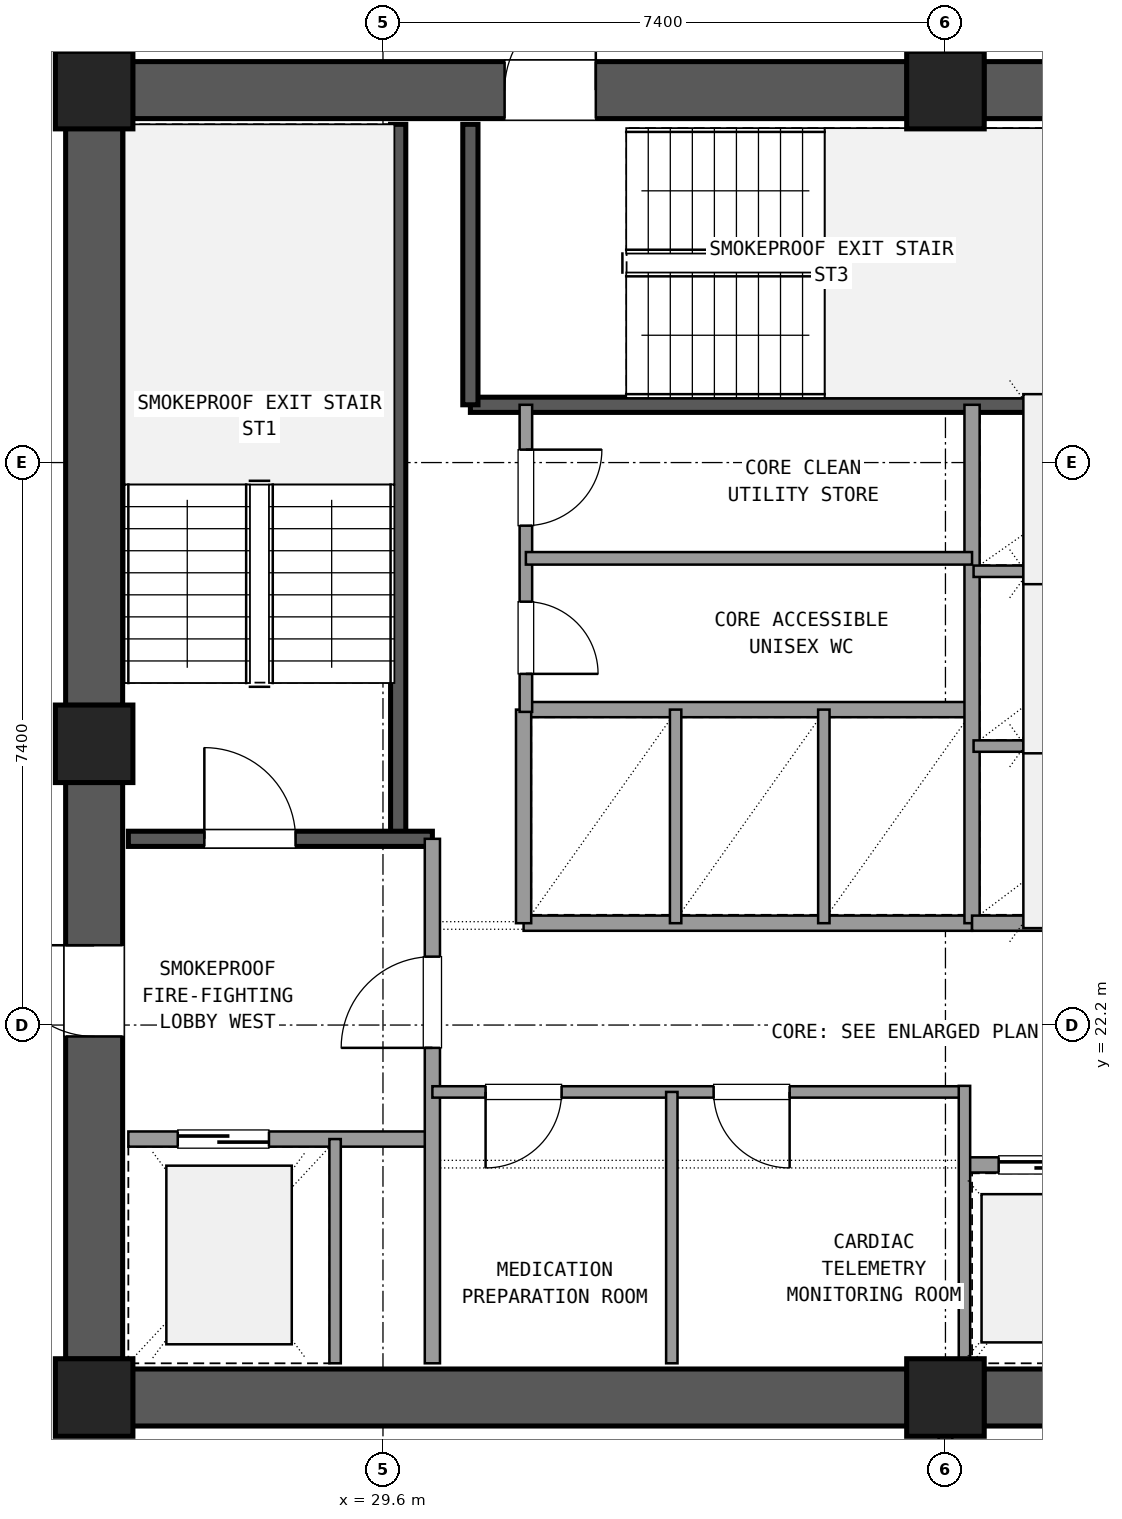
"""IFC4 building model, lengths in metres.
Left out: names, types, materials, properties, quantities, classifications, styles, units other than length and angle.
Written with IfcOpenShell. Run it as: python <this file> out.ifc"""

import sys

from ifc_helpers import new_model, si_unit, direction, frame, frame_2d, origin, origin_2d, place, context, subcontext, project, spatial, rectangle, extrude, element, fill, save


model = new_model("IFC4")
c1 = context("Model", 3, precision=1e-05, world=origin(), true_north=direction((0.0, 1.0)))
c2 = subcontext(c1, "Body", "Model", "MODEL_VIEW")
j1 = project(units=[si_unit("LENGTHUNIT", "METRE"), si_unit("PLANEANGLEUNIT", "RADIAN")], contexts=[c1])
p1 = place(None, origin())
s1 = spatial("IfcSite", under=j1, at=p1, CompositionType="ELEMENT")
p2 = place(p1, origin())
s2 = spatial("IfcBuilding", under=s1, at=p2, CompositionType="ELEMENT")
p3 = place(p2, frame((0.0, 0.0, 138.42)))
s3 = spatial("IfcBuildingStorey", under=s2, at=p3, CompositionType="ELEMENT", Elevation=138.42)
for number, where, z_axis, x_axis in (
    (1, (25.8, 17.3, 0.0), (0.0, 0.0, 1.0), (1.0, 0.0, 0.0)),
    (2, (37.0, 17.3, 0.0), (0.0, 0.0, 1.0), (1.0, 0.0, 0.0)),
    (3, (37.0, 34.5, 0.0), (0.0, 0.0, 1.0), (1.0, 0.0, 0.0)),
    (4, (25.8, 34.5, 0.0), (0.0, 0.0, 1.0), (1.0, 0.0, 0.0)),
    (5, (25.8, 25.9, 0.0), (0.0, 0.0, 1.0), (1.0, 0.0, 0.0)),
):
    element("IfcColumn", number, at=place(p3, frame(where, z_axis=z_axis, x_axis=x_axis)), inside=s3, PredefinedType="COLUMN", context=c2, shape_type="SweptSolid", body=[
        extrude(rectangle(XDim=1.02, YDim=1.02, at=origin_2d()), origin(), (0.0, 0.0, 1.0), 3.6),
    ])
for number, where, z_axis, x_axis in (
    (6, (26.305, 17.3, 0.0), (0.0, 0.0, 1.0), (1.0, 0.0, 0.0)),
    (7, (37.505, 17.3, 0.0), (0.0, 0.0, 1.0), (1.0, 0.0, 0.0)),
):
    element("IfcWall", number, at=place(p3, frame(where, z_axis=z_axis, x_axis=x_axis)), inside=s3, PredefinedType="SHEAR", context=c2, shape_type="SweptSolid", body=[
        extrude(rectangle(XDim=10.19, YDim=0.75, at=frame_2d((5.095, 0.0))), origin(), (0.0, 0.0, 1.0), 3.32),
    ])
p4 = place(p3, frame((47.695, 34.5, 0.0), z_axis=(0.0, 0.0, 1.0), x_axis=(-1.0, 0.0, 0.0)))
e8 = element("IfcWall", 8, at=p4, inside=s3, PredefinedType="SHEAR", context=c2, shape_type="SweptSolid", body=[
    extrude(rectangle(XDim=10.19, YDim=0.75, at=frame_2d((5.095, 0.0))), origin(), (0.0, 0.0, 1.0), 3.32),
])
p5 = place(p4, frame((4.595, 0.0, 0.0)))
e9 = element("IfcOpeningElement", 9, at=p5, cuts=e8, PredefinedType="OPENING", context=c2, shape_type="SweptSolid", body=[
    extrude(rectangle(XDim=1.6, YDim=2.2, at=frame_2d((0.8, 1.1))), frame((0.0, 0.385, 0.0), z_axis=(0.0, -1.0, 0.0), x_axis=(1.0, 0.0, 0.0)), (0.0, 0.0, 1.0), 0.77),
])
p6 = place(p3, frame((36.495, 34.5, 0.0), z_axis=(0.0, 0.0, 1.0), x_axis=(-1.0, 0.0, 0.0)))
e10 = element("IfcWall", 10, at=p6, inside=s3, PredefinedType="SHEAR", context=c2, shape_type="SweptSolid", body=[
    extrude(rectangle(XDim=10.19, YDim=0.75, at=frame_2d((5.095, 0.0))), origin(), (0.0, 0.0, 1.0), 3.32),
])
p7 = place(p6, frame((4.095, 0.0, 0.0)))
e11 = element("IfcOpeningElement", 11, at=p7, cuts=e10, PredefinedType="OPENING", context=c2, shape_type="SweptSolid", body=[
    extrude(rectangle(XDim=1.2, YDim=2.15, at=frame_2d((0.6, 1.075))), frame((0.0, 0.385, 0.0), z_axis=(0.0, -1.0, 0.0), x_axis=(1.0, 0.0, 0.0)), (0.0, 0.0, 1.0), 0.77),
])
p8 = place(p3, frame((25.8, 33.995, 0.0), z_axis=(0.0, 0.0, 1.0), x_axis=(0.0, -1.0, 0.0)))
e12 = element("IfcWall", 12, at=p8, inside=s3, PredefinedType="SHEAR", context=c2, shape_type="SweptSolid", body=[
    extrude(rectangle(XDim=7.59, YDim=0.75, at=frame_2d((3.795, 0.0))), origin(), (0.0, 0.0, 1.0), 3.32),
])
p9 = place(p3, frame((25.8, 25.395, 0.0), z_axis=(0.0, 0.0, 1.0), x_axis=(0.0, -1.0, 0.0)))
e13 = element("IfcWall", 13, at=p9, inside=s3, PredefinedType="SHEAR", context=c2, shape_type="SweptSolid", body=[
    extrude(rectangle(XDim=7.59, YDim=0.75, at=frame_2d((3.795, 0.0))), origin(), (0.0, 0.0, 1.0), 3.32),
])
p10 = place(p9, frame((2.145, 0.0, 0.0)))
e14 = element("IfcOpeningElement", 14, at=p10, cuts=e13, PredefinedType="OPENING", context=c2, shape_type="SweptSolid", body=[
    extrude(rectangle(XDim=1.2, YDim=2.15, at=frame_2d((0.6, 1.075))), frame((0.0, 0.385, 0.0), z_axis=(0.0, -1.0, 0.0), x_axis=(1.0, 0.0, 0.0)), (0.0, 0.0, 1.0), 0.77),
])
p11 = place(p3, frame((29.8, 24.65, 0.0), z_axis=(0.0, 0.0, 1.0), x_axis=(0.0, 1.0, 0.0)))
e15 = element("IfcWall", 15, at=p11, inside=s3, PredefinedType="SHEAR", context=c2, shape_type="SweptSolid", body=[
    extrude(rectangle(XDim=9.4, YDim=0.2, at=frame_2d((4.7, 0.0))), origin(), (0.0, 0.0, 1.0), 3.32),
])
p12 = place(p3, frame((26.25, 24.65, 0.0), z_axis=(0.0, 0.0, 1.0), x_axis=(1.0, 0.0, 0.0)))
e16 = element("IfcWall", 16, at=p12, inside=s3, PredefinedType="SHEAR", context=c2, shape_type="SweptSolid", body=[
    extrude(rectangle(XDim=4.0, YDim=0.2, at=frame_2d((2.0, 0.0))), origin(), (0.0, 0.0, 1.0), 3.32),
])
p13 = place(p12, frame((1.0, 0.0, 0.0)))
e17 = element("IfcOpeningElement", 17, at=p13, cuts=e16, PredefinedType="OPENING", context=c2, shape_type="SweptSolid", body=[
    extrude(rectangle(XDim=1.2, YDim=2.15, at=frame_2d((0.6, 1.075))), frame((0.0, 0.11, 0.0), z_axis=(0.0, -1.0, 0.0), x_axis=(1.0, 0.0, 0.0)), (0.0, 0.0, 1.0), 0.22),
])
p14 = place(p3, frame((30.75, 30.36, 0.0), z_axis=(0.0, 0.0, 1.0), x_axis=(1.0, 0.0, 0.0)))
e18 = element("IfcWall", 18, at=p14, inside=s3, PredefinedType="SHEAR", context=c2, shape_type="SweptSolid", body=[
    extrude(rectangle(XDim=9.5, YDim=0.2, at=frame_2d((4.75, 0.0))), origin(), (0.0, 0.0, 1.0), 3.32),
])
p15 = place(p3, frame((30.75, 30.36, 0.0), z_axis=(0.0, 0.0, 1.0), x_axis=(0.0, 1.0, 0.0)))
e19 = element("IfcWall", 19, at=p15, inside=s3, PredefinedType="SHEAR", context=c2, shape_type="SweptSolid", body=[
    extrude(rectangle(XDim=3.69, YDim=0.2, at=frame_2d((1.845, 0.0))), origin(), (0.0, 0.0, 1.0), 3.32),
])
p16 = place(p3, frame((26.25, 20.7, 0.0), z_axis=(0.0, 0.0, 1.0), x_axis=(1.0, 0.0, 0.0)))
e20 = element("IfcWall", 20, at=p16, inside=s3, PredefinedType="SOLIDWALL", context=c2, shape_type="SweptSolid", body=[
    extrude(rectangle(XDim=4.0, YDim=0.2, at=frame_2d((2.0, 0.0))), origin(), (0.0, 0.0, 1.0), 2.61),
])
p17 = place(p16, frame((0.65, 0.0, 0.0)))
e21 = element("IfcOpeningElement", 21, at=p17, cuts=e20, PredefinedType="OPENING", context=c2, shape_type="SweptSolid", body=[
    extrude(rectangle(XDim=1.2, YDim=2.15, at=frame_2d((0.6, 1.075))), frame((0.0, 0.11, 0.0), z_axis=(0.0, -1.0, 0.0), x_axis=(1.0, 0.0, 0.0)), (0.0, 0.0, 1.0), 0.22),
])
p18 = place(p3, frame((30.25, 17.75, 0.0), z_axis=(0.0, 0.0, 1.0), x_axis=(0.0, 1.0, 0.0)))
e22 = element("IfcWall", 22, at=p18, inside=s3, PredefinedType="SOLIDWALL", context=c2, shape_type="SweptSolid", body=[
    extrude(rectangle(XDim=6.9, YDim=0.2, at=frame_2d((3.45, 0.0))), origin(), (0.0, 0.0, 1.0), 2.61),
])
p19 = place(p18, frame((4.15, 0.0, 0.0)))
e23 = element("IfcOpeningElement", 23, at=p19, cuts=e22, PredefinedType="OPENING", context=c2, shape_type="SweptSolid", body=[
    extrude(rectangle(XDim=1.2, YDim=2.15, at=frame_2d((0.6, 1.075))), frame((0.0, 0.11, 0.0), z_axis=(0.0, -1.0, 0.0), x_axis=(1.0, 0.0, 0.0)), (0.0, 0.0, 1.0), 0.22),
])
p20 = place(p3, frame((28.97, 17.75, 0.0), z_axis=(0.0, 0.0, 1.0), x_axis=(0.0, 1.0, 0.0)))
e24 = element("IfcWall", 24, at=p20, inside=s3, PredefinedType="PARTITIONING", context=c2, shape_type="SweptSolid", body=[
    extrude(rectangle(XDim=2.95, YDim=0.15, at=frame_2d((1.475, 0.0))), origin(), (0.0, 0.0, 1.0), 2.61),
])
p21 = place(p3, frame((30.25, 21.32, 0.0), z_axis=(0.0, 0.0, 1.0), x_axis=(1.0, 0.0, 0.0)))
e25 = element("IfcWall", 25, at=p21, inside=s3, PredefinedType="PARTITIONING", context=c2, shape_type="SweptSolid", body=[
    extrude(rectangle(XDim=7.0, YDim=0.15, at=frame_2d((3.5, 0.0))), origin(), (0.0, 0.0, 1.0), 2.61),
])
p22 = place(p21, frame((0.7, 0.0, 0.0)))
e26 = element("IfcOpeningElement", 26, at=p22, cuts=e25, PredefinedType="OPENING", context=c2, shape_type="SweptSolid", body=[
    extrude(rectangle(XDim=1.0, YDim=2.15, at=frame_2d((0.5, 1.075))), frame((0.0, 0.085, 0.0), z_axis=(0.0, -1.0, 0.0), x_axis=(1.0, 0.0, 0.0)), (0.0, 0.0, 1.0), 0.17),
])
p23 = place(p21, frame((3.7, 0.0, 0.0)))
e27 = element("IfcOpeningElement", 27, at=p23, cuts=e25, PredefinedType="OPENING", context=c2, shape_type="SweptSolid", body=[
    extrude(rectangle(XDim=1.0, YDim=2.15, at=frame_2d((0.5, 1.075))), frame((0.0, 0.085, 0.0), z_axis=(0.0, -1.0, 0.0), x_axis=(1.0, 0.0, 0.0)), (0.0, 0.0, 1.0), 0.17),
])
p24 = place(p3, frame((33.4, 17.75, 0.0), z_axis=(0.0, 0.0, 1.0), x_axis=(0.0, 1.0, 0.0)))
e28 = element("IfcWall", 28, at=p24, inside=s3, PredefinedType="PARTITIONING", context=c2, shape_type="SweptSolid", body=[
    extrude(rectangle(XDim=3.57, YDim=0.15, at=frame_2d((1.785, 0.0))), origin(), (0.0, 0.0, 1.0), 2.61),
])
p25 = place(p3, frame((37.25, 20.36, 0.0), z_axis=(0.0, 0.0, 1.0), x_axis=(1.0, 0.0, 0.0)))
e29 = element("IfcWall", 29, at=p25, inside=s3, PredefinedType="SOLIDWALL", context=c2, shape_type="SweptSolid", body=[
    extrude(rectangle(XDim=6.1, YDim=0.2, at=frame_2d((3.05, 0.0))), origin(), (0.0, 0.0, 1.0), 2.61),
])
p26 = place(p25, frame((0.45, 0.0, 0.0)))
e30 = element("IfcOpeningElement", 30, at=p26, cuts=e29, PredefinedType="OPENING", context=c2, shape_type="SweptSolid", body=[
    extrude(rectangle(XDim=1.1, YDim=2.15, at=frame_2d((0.55, 1.075))), frame((0.0, 0.11, 0.0), z_axis=(0.0, -1.0, 0.0), x_axis=(1.0, 0.0, 0.0)), (0.0, 0.0, 1.0), 0.22),
])
p27 = place(p25, frame((2.5, 0.0, 0.0)))
e31 = element("IfcOpeningElement", 31, at=p27, cuts=e29, PredefinedType="OPENING", context=c2, shape_type="SweptSolid", body=[
    extrude(rectangle(XDim=1.1, YDim=2.15, at=frame_2d((0.55, 1.075))), frame((0.0, 0.11, 0.0), z_axis=(0.0, -1.0, 0.0), x_axis=(1.0, 0.0, 0.0)), (0.0, 0.0, 1.0), 0.22),
])
p28 = place(p25, frame((4.55, 0.0, 0.0)))
e32 = element("IfcOpeningElement", 32, at=p28, cuts=e29, PredefinedType="OPENING", context=c2, shape_type="SweptSolid", body=[
    extrude(rectangle(XDim=1.1, YDim=2.15, at=frame_2d((0.55, 1.075))), frame((0.0, 0.11, 0.0), z_axis=(0.0, -1.0, 0.0), x_axis=(1.0, 0.0, 0.0)), (0.0, 0.0, 1.0), 0.22),
])
p29 = place(p3, frame((37.25, 17.75, 0.0), z_axis=(0.0, 0.0, 1.0), x_axis=(0.0, 1.0, 0.0)))
e33 = element("IfcWall", 33, at=p29, inside=s3, PredefinedType="PARTITIONING", context=c2, shape_type="SweptSolid", body=[
    extrude(rectangle(XDim=3.65, YDim=0.15, at=frame_2d((1.825, 0.0))), origin(), (0.0, 0.0, 1.0), 2.61),
])
for number, where, z_axis, x_axis in (
    (34, (31.45, 23.54, 0.0), (0.0, 0.0, 1.0), (1.0, 0.0, 0.0)),
    (35, (31.45, 26.35, 0.0), (0.0, 0.0, 1.0), (1.0, 0.0, 0.0)),
):
    element("IfcWall", number, at=place(p3, frame(where, z_axis=z_axis, x_axis=x_axis)), inside=s3, PredefinedType="SOLIDWALL", context=c2, shape_type="SweptSolid", body=[
        extrude(rectangle(XDim=5.9, YDim=0.2, at=frame_2d((2.95, 0.0))), origin(), (0.0, 0.0, 1.0), 2.61),
    ])
p30 = place(p3, frame((31.45, 23.54, 0.0), z_axis=(0.0, 0.0, 1.0), x_axis=(0.0, 1.0, 0.0)))
e36 = element("IfcWall", 36, at=p30, inside=s3, PredefinedType="SOLIDWALL", context=c2, shape_type="SweptSolid", body=[
    extrude(rectangle(XDim=2.81, YDim=0.2, at=frame_2d((1.405, 0.0))), origin(), (0.0, 0.0, 1.0), 2.61),
])
for number, where, z_axis, x_axis in (
    (37, (33.45, 23.54, 0.0), (0.0, 0.0, 1.0), (0.0, 1.0, 0.0)),
    (38, (35.4, 23.54, 0.0), (0.0, 0.0, 1.0), (0.0, 1.0, 0.0)),
):
    element("IfcWall", number, at=place(p3, frame(where, z_axis=z_axis, x_axis=x_axis)), inside=s3, PredefinedType="PARTITIONING", context=c2, shape_type="SweptSolid", body=[
        extrude(rectangle(XDim=2.81, YDim=0.15, at=frame_2d((1.405, 0.0))), origin(), (0.0, 0.0, 1.0), 2.61),
    ])
p31 = place(p3, frame((37.35, 23.54, 0.0), z_axis=(0.0, 0.0, 1.0), x_axis=(0.0, 1.0, 0.0)))
e39 = element("IfcWall", 39, at=p31, inside=s3, PredefinedType="SOLIDWALL", context=c2, shape_type="SweptSolid", body=[
    extrude(rectangle(XDim=6.82, YDim=0.2, at=frame_2d((3.41, 0.0))), origin(), (0.0, 0.0, 1.0), 2.61),
])
p32 = place(p3, frame((37.35, 23.54, 0.0), z_axis=(0.0, 0.0, 1.0), x_axis=(1.0, 0.0, 0.0)))
e40 = element("IfcWall", 40, at=p32, inside=s3, PredefinedType="SOLIDWALL", context=c2, shape_type="SweptSolid", body=[
    extrude(rectangle(XDim=3.05, YDim=0.2, at=frame_2d((1.525, 0.0))), origin(), (0.0, 0.0, 1.0), 2.61),
])
for number, where, z_axis, x_axis in (
    (41, (37.37, 25.87, 0.0), (0.0, 0.0, 1.0), (1.0, 0.0, 0.0)),
    (42, (37.37, 28.17, 0.0), (0.0, 0.0, 1.0), (1.0, 0.0, 0.0)),
):
    element("IfcWall", number, at=place(p3, frame(where, z_axis=z_axis, x_axis=x_axis)), inside=s3, PredefinedType="PARTITIONING", context=c2, shape_type="SweptSolid", body=[
        extrude(rectangle(XDim=3.01, YDim=0.15, at=frame_2d((1.505, 0.0))), origin(), (0.0, 0.0, 1.0), 2.61),
    ])
p33 = place(p3, frame((31.48, 26.32, 0.0), z_axis=(0.0, 0.0, 1.0), x_axis=(0.0, 1.0, 0.0)))
e43 = element("IfcWall", 43, at=p33, inside=s3, PredefinedType="PLUMBINGWALL", context=c2, shape_type="SweptSolid", body=[
    extrude(rectangle(XDim=4.04, YDim=0.165, at=frame_2d((2.02, 0.0))), origin(), (0.0, 0.0, 1.0), 2.61),
])
p34 = place(p33, frame((0.5, 0.0, 0.0)))
e44 = element("IfcOpeningElement", 44, at=p34, cuts=e43, PredefinedType="OPENING", context=c2, shape_type="SweptSolid", body=[
    extrude(rectangle(XDim=0.95, YDim=2.1, at=frame_2d((0.475, 1.05))), frame((0.0, 0.093, 0.0), z_axis=(0.0, -1.0, 0.0), x_axis=(1.0, 0.0, 0.0)), (0.0, 0.0, 1.0), 0.185),
])
p35 = place(p33, frame((2.45, 0.0, 0.0)))
e45 = element("IfcOpeningElement", 45, at=p35, cuts=e43, PredefinedType="OPENING", context=c2, shape_type="SweptSolid", body=[
    extrude(rectangle(XDim=1.0, YDim=2.15, at=frame_2d((0.5, 1.075))), frame((0.0, 0.093, 0.0), z_axis=(0.0, -1.0, 0.0), x_axis=(1.0, 0.0, 0.0)), (0.0, 0.0, 1.0), 0.185),
])
p36 = place(p3, frame((31.48, 28.34, 0.0), z_axis=(0.0, 0.0, 1.0), x_axis=(1.0, 0.0, 0.0)))
e46 = element("IfcWall", 46, at=p36, inside=s3, PredefinedType="PLUMBINGWALL", context=c2, shape_type="SweptSolid", body=[
    extrude(rectangle(XDim=5.87, YDim=0.165, at=frame_2d((2.935, 0.0))), origin(), (0.0, 0.0, 1.0), 2.61),
])
p37 = place(p3, frame((37.0, 34.95, 0.0), z_axis=(0.0, 0.0, 1.0), x_axis=(0.0, 1.0, 0.0)))
e47 = element("IfcWall", 47, at=p37, inside=s3, PredefinedType="PARTITIONING", context=c2, shape_type="SweptSolid", body=[
    extrude(rectangle(XDim=3.21, YDim=0.18, at=frame_2d((1.605, 0.0))), origin(), (0.0, 0.0, 1.0), 2.61),
])
p38 = place(p37, frame((0.605, 0.0, 0.0)))
e48 = element("IfcOpeningElement", 48, at=p38, cuts=e47, PredefinedType="OPENING", context=c2, shape_type="SweptSolid", body=[
    extrude(rectangle(XDim=2.0, YDim=2.2, at=frame_2d((1.0, 1.1))), frame((0.0, 0.1, 0.0), z_axis=(0.0, -1.0, 0.0), x_axis=(1.0, 0.0, 0.0)), (0.0, 0.0, 1.0), 0.2),
])
p39 = place(p3, frame((37.0, 13.64, 0.0), z_axis=(0.0, 0.0, 1.0), x_axis=(0.0, 1.0, 0.0)))
e49 = element("IfcWall", 49, at=p39, inside=s3, PredefinedType="PARTITIONING", context=c2, shape_type="SweptSolid", body=[
    extrude(rectangle(XDim=3.21, YDim=0.18, at=frame_2d((1.605, 0.0))), origin(), (0.0, 0.0, 1.0), 2.61),
])
p40 = place(p39, frame((0.605, 0.0, 0.0)))
e50 = element("IfcOpeningElement", 50, at=p40, cuts=e49, PredefinedType="OPENING", context=c2, shape_type="SweptSolid", body=[
    extrude(rectangle(XDim=2.0, YDim=2.2, at=frame_2d((1.0, 1.1))), frame((0.0, 0.1, 0.0), z_axis=(0.0, -1.0, 0.0), x_axis=(1.0, 0.0, 0.0)), (0.0, 0.0, 1.0), 0.2),
])
p41 = place(p13, origin())
e51 = element("IfcDoor", 51, at=p41, inside=s3, OperationType="SINGLE_SWING_LEFT", PredefinedType="DOOR", context=c2, shape_type="SweptSolid", body=[
    extrude(rectangle(XDim=1.2, YDim=2.15, at=frame_2d((0.6, 1.075))), frame((0.0, 0.025, 0.0), z_axis=(0.0, -1.0, 0.0), x_axis=(1.0, 0.0, 0.0)), (0.0, 0.0, 1.0), 0.05),
])
fill(e17, e51)
p42 = place(p17, origin())
e52 = element("IfcDoor", 52, at=p42, inside=s3, OperationType="SLIDING_TO_LEFT", PredefinedType="DOOR", context=c2, shape_type="SweptSolid", body=[
    extrude(rectangle(XDim=1.2, YDim=2.15, at=frame_2d((0.6, 1.075))), frame((0.0, 0.025, 0.0), z_axis=(0.0, -1.0, 0.0), x_axis=(1.0, 0.0, 0.0)), (0.0, 0.0, 1.0), 0.05),
])
fill(e21, e52)
p43 = place(p19, origin())
e53 = element("IfcDoor", 53, at=p43, inside=s3, OperationType="SINGLE_SWING_LEFT", PredefinedType="DOOR", context=c2, shape_type="SweptSolid", body=[
    extrude(rectangle(XDim=1.2, YDim=2.15, at=frame_2d((0.6, 1.075))), frame((0.0, 0.025, 0.0), z_axis=(0.0, -1.0, 0.0), x_axis=(1.0, 0.0, 0.0)), (0.0, 0.0, 1.0), 0.05),
])
fill(e23, e53)
p44 = place(p10, frame((1.2, 0.0, 0.0), z_axis=(0.0, 0.0, 1.0), x_axis=(-1.0, 0.0, 0.0)))
e54 = element("IfcDoor", 54, at=p44, inside=s3, OperationType="SINGLE_SWING_LEFT", PredefinedType="DOOR", context=c2, shape_type="SweptSolid", body=[
    extrude(rectangle(XDim=1.2, YDim=2.15, at=frame_2d((0.6, 1.075))), frame((0.0, 0.025, 0.0), z_axis=(0.0, -1.0, 0.0), x_axis=(1.0, 0.0, 0.0)), (0.0, 0.0, 1.0), 0.05),
])
fill(e14, e54)
p45 = place(p7, frame((1.2, 0.0, 0.0), z_axis=(0.0, 0.0, 1.0), x_axis=(-1.0, 0.0, 0.0)))
e55 = element("IfcDoor", 55, at=p45, inside=s3, OperationType="SINGLE_SWING_LEFT", PredefinedType="DOOR", context=c2, shape_type="SweptSolid", body=[
    extrude(rectangle(XDim=1.2, YDim=2.15, at=frame_2d((0.6, 1.075))), frame((0.0, 0.025, 0.0), z_axis=(0.0, -1.0, 0.0), x_axis=(1.0, 0.0, 0.0)), (0.0, 0.0, 1.0), 0.05),
])
fill(e11, e55)
p46 = place(p22, frame((1.0, 0.0, 0.0), z_axis=(0.0, 0.0, 1.0), x_axis=(-1.0, 0.0, 0.0)))
e56 = element("IfcDoor", 56, at=p46, inside=s3, OperationType="SINGLE_SWING_LEFT", PredefinedType="DOOR", context=c2, shape_type="SweptSolid", body=[
    extrude(rectangle(XDim=1.0, YDim=2.15, at=frame_2d((0.5, 1.075))), frame((0.0, 0.025, 0.0), z_axis=(0.0, -1.0, 0.0), x_axis=(1.0, 0.0, 0.0)), (0.0, 0.0, 1.0), 0.05),
])
fill(e26, e56)
p47 = place(p23, frame((1.0, 0.0, 0.0), z_axis=(0.0, 0.0, 1.0), x_axis=(-1.0, 0.0, 0.0)))
e57 = element("IfcDoor", 57, at=p47, inside=s3, OperationType="SINGLE_SWING_RIGHT", PredefinedType="DOOR", context=c2, shape_type="SweptSolid", body=[
    extrude(rectangle(XDim=1.0, YDim=2.15, at=frame_2d((0.5, 1.075))), frame((0.0, 0.025, 0.0), z_axis=(0.0, -1.0, 0.0), x_axis=(1.0, 0.0, 0.0)), (0.0, 0.0, 1.0), 0.05),
])
fill(e27, e57)
p48 = place(p26, origin())
e58 = element("IfcDoor", 58, at=p48, inside=s3, OperationType="SLIDING_TO_LEFT", PredefinedType="DOOR", context=c2, shape_type="SweptSolid", body=[
    extrude(rectangle(XDim=1.1, YDim=2.15, at=frame_2d((0.55, 1.075))), frame((0.0, 0.025, 0.0), z_axis=(0.0, -1.0, 0.0), x_axis=(1.0, 0.0, 0.0)), (0.0, 0.0, 1.0), 0.05),
])
fill(e30, e58)
p49 = place(p34, frame((0.95, 0.0, 0.0), z_axis=(0.0, 0.0, 1.0), x_axis=(-1.0, 0.0, 0.0)))
e59 = element("IfcDoor", 59, at=p49, inside=s3, OperationType="SINGLE_SWING_LEFT", PredefinedType="DOOR", context=c2, shape_type="SweptSolid", body=[
    extrude(rectangle(XDim=0.95, YDim=2.1, at=frame_2d((0.475, 1.05))), frame((0.0, 0.025, 0.0), z_axis=(0.0, -1.0, 0.0), x_axis=(1.0, 0.0, 0.0)), (0.0, 0.0, 1.0), 0.05),
])
fill(e44, e59)
p50 = place(p35, frame((1.0, 0.0, 0.0), z_axis=(0.0, 0.0, 1.0), x_axis=(-1.0, 0.0, 0.0)))
e60 = element("IfcDoor", 60, at=p50, inside=s3, OperationType="SINGLE_SWING_RIGHT", PredefinedType="DOOR", context=c2, shape_type="SweptSolid", body=[
    extrude(rectangle(XDim=1.0, YDim=2.15, at=frame_2d((0.5, 1.075))), frame((0.0, 0.025, 0.0), z_axis=(0.0, -1.0, 0.0), x_axis=(1.0, 0.0, 0.0)), (0.0, 0.0, 1.0), 0.05),
])
fill(e45, e60)
save(model, sys.argv[1])
